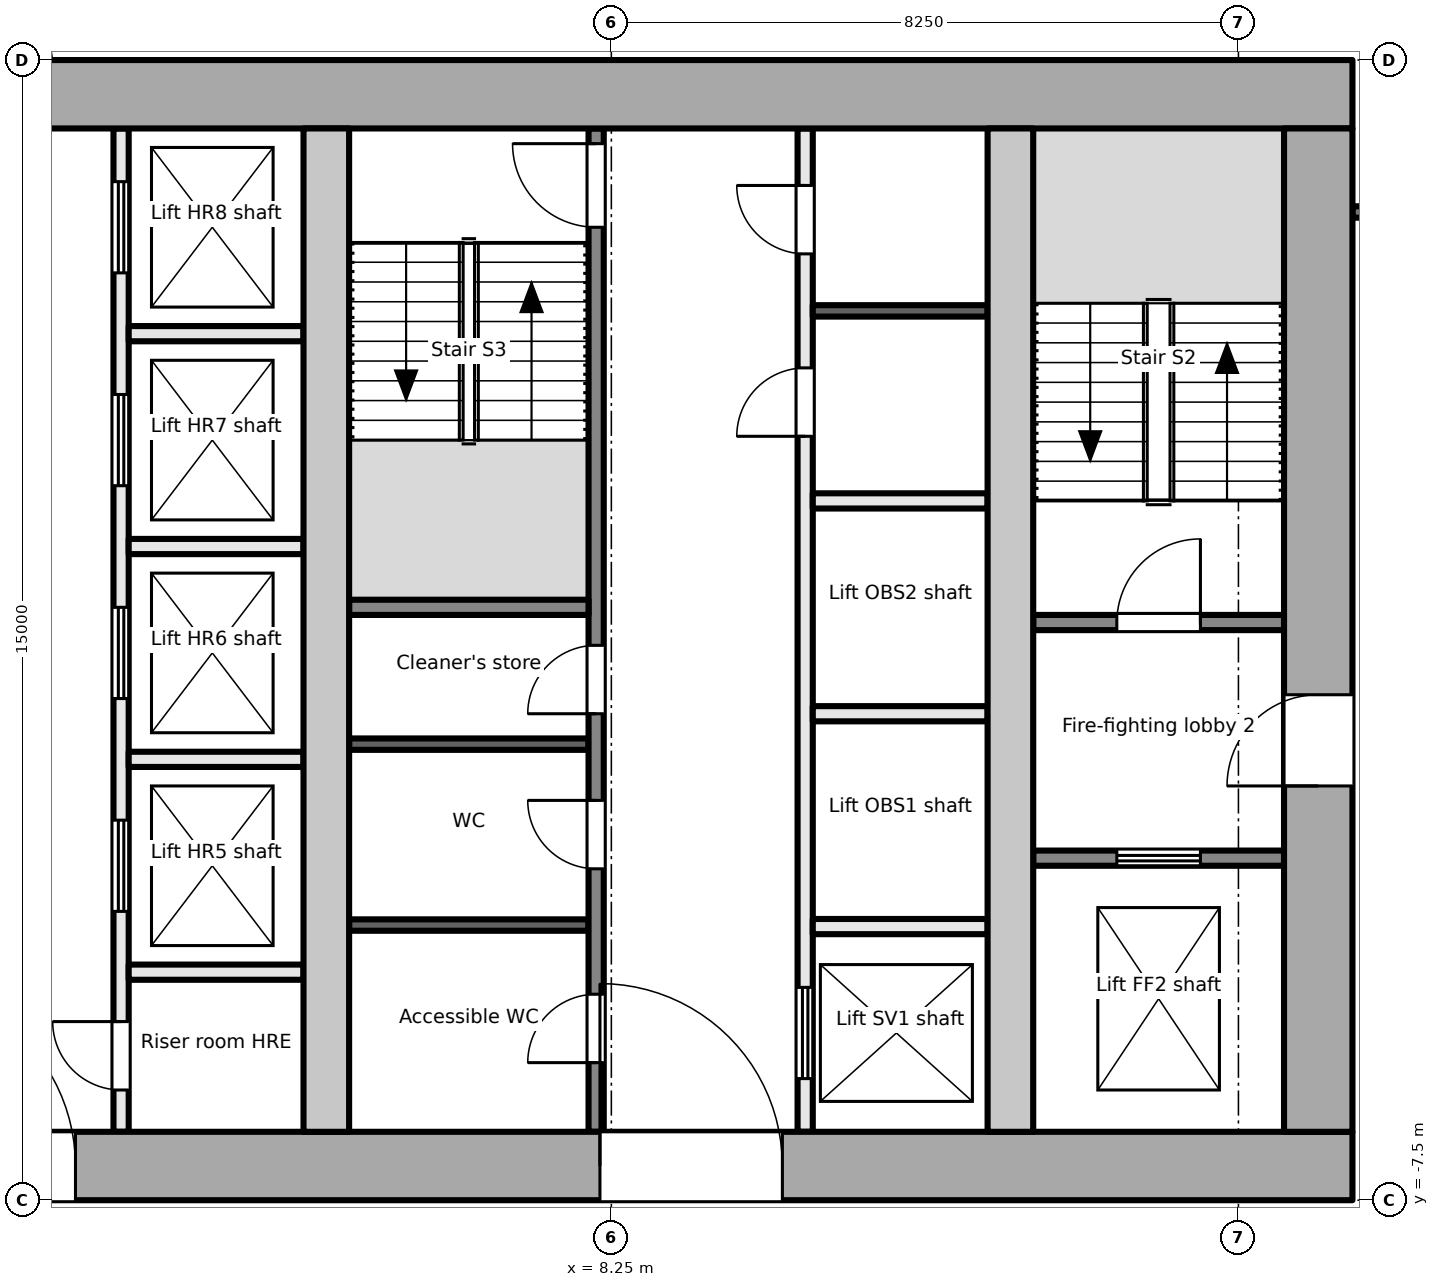
"""IFC4 building model, lengths in metres.
Left out: names, types, materials, properties, quantities, classifications, styles, units other than length and angle.
Written with IfcOpenShell. Run it as: python <this file> out.ifc"""

import sys

from ifc_helpers import new_model, si_unit, direction, frame, frame_2d, origin, place, context, subcontext, project, spatial, rectangle, extrude, element, fill, save


model = new_model("IFC4")
c1 = context("Model", 3, precision=1e-05, world=origin(), true_north=direction((0.0, 1.0)))
c2 = subcontext(c1, "Body", "Model", "MODEL_VIEW")
j1 = project(units=[si_unit("LENGTHUNIT", "METRE"), si_unit("PLANEANGLEUNIT", "RADIAN")], contexts=[c1])
p1 = place(None, origin())
s1 = spatial("IfcSite", under=j1, at=p1, CompositionType="ELEMENT")
p2 = place(p1, origin())
s2 = spatial("IfcBuilding", under=s1, at=p2, CompositionType="ELEMENT")
p3 = place(p2, frame((0.0, 0.0, 176.3)))
s3 = spatial("IfcBuildingStorey", under=s2, at=p3, CompositionType="ELEMENT", Elevation=176.3)
p4 = place(p3, frame((-18.0, -7.05, -0.2), z_axis=(0.0, 0.0, 1.0), x_axis=(1.0, 0.0, 0.0)))
e1 = element("IfcWall", 1, at=p4, inside=s3, PredefinedType="SHEAR", context=c2, shape_type="SweptSolid", body=[
    extrude(rectangle(XDim=36.0, YDim=0.9, at=frame_2d((18.0, 0.0))), origin(), (0.0, 0.0, 1.0), 3.9),
])
p5 = place(p4, frame((8.1, 0.0, 0.2)))
e2 = element("IfcOpeningElement", 2, at=p5, cuts=e1, PredefinedType="OPENING", context=c2, shape_type="SweptSolid", body=[
    extrude(rectangle(XDim=1.8, YDim=2.1, at=frame_2d((0.9, 1.05))), frame((0.0, 0.46, 0.0), z_axis=(0.0, -1.0, 0.0), x_axis=(1.0, 0.0, 0.0)), (0.0, 0.0, 1.0), 0.921),
])
p6 = place(p4, frame((16.8, 0.0, 0.2)))
e3 = element("IfcOpeningElement", 3, at=p6, cuts=e1, PredefinedType="OPENING", context=c2, shape_type="SweptSolid", body=[
    extrude(rectangle(XDim=2.4, YDim=2.1, at=frame_2d((1.2, 1.05))), frame((0.0, 0.46, 0.0), z_axis=(0.0, -1.0, 0.0), x_axis=(1.0, 0.0, 0.0)), (0.0, 0.0, 1.0), 0.921),
])
p7 = place(p4, frame((26.1, 0.0, 0.2)))
e4 = element("IfcOpeningElement", 4, at=p7, cuts=e1, PredefinedType="OPENING", context=c2, shape_type="SweptSolid", body=[
    extrude(rectangle(XDim=2.4, YDim=2.1, at=frame_2d((1.2, 1.05))), frame((0.0, 0.46, 0.0), z_axis=(0.0, -1.0, 0.0), x_axis=(1.0, 0.0, 0.0)), (0.0, 0.0, 1.0), 0.921),
])
p8 = place(p3, frame((-18.0, 7.05, -0.2), z_axis=(0.0, 0.0, 1.0), x_axis=(1.0, 0.0, 0.0)))
e5 = element("IfcWall", 5, at=p8, inside=s3, PredefinedType="SHEAR", context=c2, shape_type="SweptSolid", body=[
    extrude(rectangle(XDim=36.0, YDim=0.9, at=frame_2d((18.0, 0.0))), origin(), (0.0, 0.0, 1.0), 3.9),
])
p9 = place(p3, frame((17.55, -6.6, -0.2), z_axis=(0.0, 0.0, 1.0), x_axis=(0.0, 1.0, 0.0)))
e6 = element("IfcWall", 6, at=p9, inside=s3, PredefinedType="SHEAR", context=c2, shape_type="SweptSolid", body=[
    extrude(rectangle(XDim=13.2, YDim=0.9, at=frame_2d((6.6, 0.0))), origin(), (0.0, 0.0, 1.0), 3.9),
])
p10 = place(p9, frame((4.55, 0.0, 0.2)))
e7 = element("IfcOpeningElement", 7, at=p10, cuts=e6, PredefinedType="OPENING", context=c2, shape_type="SweptSolid", body=[
    extrude(rectangle(XDim=1.2, YDim=2.1, at=frame_2d((0.6, 1.05))), frame((0.0, 0.46, 0.0), z_axis=(0.0, -1.0, 0.0), x_axis=(1.0, 0.0, 0.0)), (0.0, 0.0, 1.0), 0.921),
])
for number, where, z_axis, x_axis in (
    (8, (4.5, -6.6, -0.2), (0.0, 0.0, 1.0), (0.0, 1.0, 0.0)),
    (9, (13.5, -6.6, -0.2), (0.0, 0.0, 1.0), (0.0, 1.0, 0.0)),
):
    element("IfcWall", number, at=place(p3, frame(where, z_axis=z_axis, x_axis=x_axis)), inside=s3, PredefinedType="SHEAR", context=c2, shape_type="SweptSolid", body=[
        extrude(rectangle(XDim=13.2, YDim=0.6, at=frame_2d((6.6, 0.0))), origin(), (0.0, 0.0, 1.0), 3.9),
    ])
p11 = place(p3, frame((13.8, -3.0, 0.0), z_axis=(0.0, 0.0, 1.0), x_axis=(1.0, 0.0, 0.0)))
e10 = element("IfcWall", 10, at=p11, inside=s3, PredefinedType="PARTITIONING", context=c2, shape_type="SweptSolid", body=[
    extrude(rectangle(XDim=3.3, YDim=0.2, at=frame_2d((1.65, 0.0))), origin(), (0.0, 0.0, 1.0), 3.7),
])
p12 = place(p11, frame((1.1, 0.0, 0.0)))
e11 = element("IfcOpeningElement", 11, at=p12, cuts=e10, PredefinedType="OPENING", context=c2, shape_type="SweptSolid", body=[
    extrude(rectangle(XDim=1.1, YDim=2.1, at=frame_2d((0.55, 1.05))), frame((0.0, 0.111, 0.0), z_axis=(0.0, -1.0, 0.0), x_axis=(1.0, 0.0, 0.0)), (0.0, 0.0, 1.0), 0.221),
])
p13 = place(p3, frame((13.8, 0.1, 0.0), z_axis=(0.0, 0.0, 1.0), x_axis=(1.0, 0.0, 0.0)))
e12 = element("IfcWall", 12, at=p13, inside=s3, PredefinedType="PARTITIONING", context=c2, shape_type="SweptSolid", body=[
    extrude(rectangle(XDim=3.3, YDim=0.2, at=frame_2d((1.65, 0.0))), origin(), (0.0, 0.0, 1.0), 3.7),
])
p14 = place(p13, frame((1.1, 0.0, 0.0)))
e13 = element("IfcOpeningElement", 13, at=p14, cuts=e12, PredefinedType="OPENING", context=c2, shape_type="SweptSolid", body=[
    extrude(rectangle(XDim=1.1, YDim=2.1, at=frame_2d((0.55, 1.05))), frame((0.0, 0.111, 0.0), z_axis=(0.0, -1.0, 0.0), x_axis=(1.0, 0.0, 0.0)), (0.0, 0.0, 1.0), 0.221),
])
p15 = place(p3, frame((1.8, -6.6, 0.0), z_axis=(0.0, 0.0, 1.0), x_axis=(0.0, 1.0, 0.0)))
e14 = element("IfcWall", 14, at=p15, inside=s3, PredefinedType="PARTITIONING", context=c2, shape_type="SweptSolid", body=[
    extrude(rectangle(XDim=13.2, YDim=0.2, at=frame_2d((6.6, 0.0))), origin(), (0.0, 0.0, 1.0), 3.7),
])
p16 = place(p15, frame((0.55, 0.0, 0.0)))
e15 = element("IfcOpeningElement", 15, at=p16, cuts=e14, PredefinedType="OPENING", context=c2, shape_type="SweptSolid", body=[
    extrude(rectangle(XDim=0.9, YDim=2.1, at=frame_2d((0.45, 1.05))), frame((0.0, 0.111, 0.0), z_axis=(0.0, -1.0, 0.0), x_axis=(1.0, 0.0, 0.0)), (0.0, 0.0, 1.0), 0.221),
])
p17 = place(p15, frame((2.9, 0.0, 0.0)))
e16 = element("IfcOpeningElement", 16, at=p17, cuts=e14, PredefinedType="OPENING", context=c2, shape_type="SweptSolid", body=[
    extrude(rectangle(XDim=1.2, YDim=2.1, at=frame_2d((0.6, 1.05))), frame((0.0, 0.111, 0.0), z_axis=(0.0, -1.0, 0.0), x_axis=(1.0, 0.0, 0.0)), (0.0, 0.0, 1.0), 0.221),
])
p18 = place(p15, frame((5.7, 0.0, 0.0)))
e17 = element("IfcOpeningElement", 17, at=p18, cuts=e14, PredefinedType="OPENING", context=c2, shape_type="SweptSolid", body=[
    extrude(rectangle(XDim=1.2, YDim=2.1, at=frame_2d((0.6, 1.05))), frame((0.0, 0.111, 0.0), z_axis=(0.0, -1.0, 0.0), x_axis=(1.0, 0.0, 0.0)), (0.0, 0.0, 1.0), 0.221),
])
p19 = place(p15, frame((8.5, 0.0, 0.0)))
e18 = element("IfcOpeningElement", 18, at=p19, cuts=e14, PredefinedType="OPENING", context=c2, shape_type="SweptSolid", body=[
    extrude(rectangle(XDim=1.2, YDim=2.1, at=frame_2d((0.6, 1.05))), frame((0.0, 0.111, 0.0), z_axis=(0.0, -1.0, 0.0), x_axis=(1.0, 0.0, 0.0)), (0.0, 0.0, 1.0), 0.221),
])
p20 = place(p15, frame((11.3, 0.0, 0.0)))
e19 = element("IfcOpeningElement", 19, at=p20, cuts=e14, PredefinedType="OPENING", context=c2, shape_type="SweptSolid", body=[
    extrude(rectangle(XDim=1.2, YDim=2.1, at=frame_2d((0.6, 1.05))), frame((0.0, 0.111, 0.0), z_axis=(0.0, -1.0, 0.0), x_axis=(1.0, 0.0, 0.0)), (0.0, 0.0, 1.0), 0.221),
])
for number, where, z_axis, x_axis in (
    (20, (1.9, -1.7, 0.0), (0.0, 0.0, 1.0), (1.0, 0.0, 0.0)),
    (21, (1.9, 1.1, 0.0), (0.0, 0.0, 1.0), (1.0, 0.0, 0.0)),
    (22, (1.9, 3.9, 0.0), (0.0, 0.0, 1.0), (1.0, 0.0, 0.0)),
    (23, (1.9, -4.5, 0.0), (0.0, 0.0, 1.0), (1.0, 0.0, 0.0)),
):
    element("IfcWall", number, at=place(p3, frame(where, z_axis=z_axis, x_axis=x_axis)), inside=s3, PredefinedType="PARTITIONING", context=c2, shape_type="SweptSolid", body=[
        extrude(rectangle(XDim=2.3, YDim=0.2, at=frame_2d((1.15, 0.0))), origin(), (0.0, 0.0, 1.0), 3.7),
    ])
p21 = place(p3, frame((8.05, -6.6, 0.0), z_axis=(0.0, 0.0, 1.0), x_axis=(0.0, 1.0, 0.0)))
e24 = element("IfcWall", 24, at=p21, inside=s3, PredefinedType="PARTITIONING", context=c2, shape_type="SweptSolid", body=[
    extrude(rectangle(XDim=13.2, YDim=0.2, at=frame_2d((6.6, 0.0))), origin(), (0.0, 0.0, 1.0), 3.7),
])
p22 = place(p21, frame((0.91, 0.0, 0.0)))
e25 = element("IfcOpeningElement", 25, at=p22, cuts=e24, PredefinedType="OPENING", context=c2, shape_type="SweptSolid", body=[
    extrude(rectangle(XDim=0.9, YDim=2.1, at=frame_2d((0.45, 1.05))), frame((0.0, 0.111, 0.0), z_axis=(0.0, -1.0, 0.0), x_axis=(1.0, 0.0, 0.0)), (0.0, 0.0, 1.0), 0.221),
])
p23 = place(p21, frame((3.46, 0.0, 0.0)))
e26 = element("IfcOpeningElement", 26, at=p23, cuts=e24, PredefinedType="OPENING", context=c2, shape_type="SweptSolid", body=[
    extrude(rectangle(XDim=0.9, YDim=2.1, at=frame_2d((0.45, 1.05))), frame((0.0, 0.111, 0.0), z_axis=(0.0, -1.0, 0.0), x_axis=(1.0, 0.0, 0.0)), (0.0, 0.0, 1.0), 0.221),
])
p24 = place(p21, frame((5.5, 0.0, 0.0)))
e27 = element("IfcOpeningElement", 27, at=p24, cuts=e24, PredefinedType="OPENING", context=c2, shape_type="SweptSolid", body=[
    extrude(rectangle(XDim=0.9, YDim=2.1, at=frame_2d((0.45, 1.05))), frame((0.0, 0.111, 0.0), z_axis=(0.0, -1.0, 0.0), x_axis=(1.0, 0.0, 0.0)), (0.0, 0.0, 1.0), 0.221),
])
p25 = place(p21, frame((11.9, 0.0, 0.0)))
e28 = element("IfcOpeningElement", 28, at=p25, cuts=e24, PredefinedType="OPENING", context=c2, shape_type="SweptSolid", body=[
    extrude(rectangle(XDim=1.1, YDim=2.1, at=frame_2d((0.55, 1.05))), frame((0.0, 0.111, 0.0), z_axis=(0.0, -1.0, 0.0), x_axis=(1.0, 0.0, 0.0)), (0.0, 0.0, 1.0), 0.221),
])
p26 = place(p3, frame((10.8, -6.6, 0.0), z_axis=(0.0, 0.0, 1.0), x_axis=(0.0, 1.0, 0.0)))
e29 = element("IfcWall", 29, at=p26, inside=s3, PredefinedType="PARTITIONING", context=c2, shape_type="SweptSolid", body=[
    extrude(rectangle(XDim=13.2, YDim=0.2, at=frame_2d((6.6, 0.0))), origin(), (0.0, 0.0, 1.0), 3.7),
])
p27 = place(p26, frame((0.7, 0.0, 0.0)))
e30 = element("IfcOpeningElement", 30, at=p27, cuts=e29, PredefinedType="OPENING", context=c2, shape_type="SweptSolid", body=[
    extrude(rectangle(XDim=1.2, YDim=2.1, at=frame_2d((0.6, 1.05))), frame((0.0, 0.111, 0.0), z_axis=(0.0, -1.0, 0.0), x_axis=(1.0, 0.0, 0.0)), (0.0, 0.0, 1.0), 0.221),
])
p28 = place(p26, frame((9.15, 0.0, 0.0)))
e31 = element("IfcOpeningElement", 31, at=p28, cuts=e29, PredefinedType="OPENING", context=c2, shape_type="SweptSolid", body=[
    extrude(rectangle(XDim=0.9, YDim=2.1, at=frame_2d((0.45, 1.05))), frame((0.0, 0.111, 0.0), z_axis=(0.0, -1.0, 0.0), x_axis=(1.0, 0.0, 0.0)), (0.0, 0.0, 1.0), 0.221),
])
p29 = place(p26, frame((11.55, 0.0, 0.0)))
e32 = element("IfcOpeningElement", 32, at=p29, cuts=e29, PredefinedType="OPENING", context=c2, shape_type="SweptSolid", body=[
    extrude(rectangle(XDim=0.9, YDim=2.1, at=frame_2d((0.45, 1.05))), frame((0.0, 0.111, 0.0), z_axis=(0.0, -1.0, 0.0), x_axis=(1.0, 0.0, 0.0)), (0.0, 0.0, 1.0), 0.221),
])
p30 = place(p3, frame((4.8, 0.3, 0.0), z_axis=(0.0, 0.0, 1.0), x_axis=(1.0, 0.0, 0.0)))
e33 = element("IfcWall", 33, at=p30, inside=s3, PredefinedType="PARTITIONING", context=c2, shape_type="SweptSolid", body=[
    extrude(rectangle(XDim=3.15, YDim=0.2, at=frame_2d((1.575, 0.0))), origin(), (0.0, 0.0, 1.0), 3.7),
])
for number, where, z_axis, x_axis in (
    (34, (4.8, -3.88, 0.0), (0.0, 0.0, 1.0), (1.0, 0.0, 0.0)),
    (35, (4.8, -1.5, 0.0), (0.0, 0.0, 1.0), (1.0, 0.0, 0.0)),
):
    element("IfcWall", number, at=place(p3, frame(where, z_axis=z_axis, x_axis=x_axis)), inside=s3, PredefinedType="PARTITIONING", context=c2, shape_type="SweptSolid", body=[
        extrude(rectangle(XDim=3.15, YDim=0.15, at=frame_2d((1.575, 0.0))), origin(), (0.0, 0.0, 1.0), 3.7),
    ])
for number, where, z_axis, x_axis in (
    (36, (10.9, -3.9, 0.0), (0.0, 0.0, 1.0), (1.0, 0.0, 0.0)),
    (37, (10.9, -1.1, 0.0), (0.0, 0.0, 1.0), (1.0, 0.0, 0.0)),
    (38, (10.9, 1.7, 0.0), (0.0, 0.0, 1.0), (1.0, 0.0, 0.0)),
):
    element("IfcWall", number, at=place(p3, frame(where, z_axis=z_axis, x_axis=x_axis)), inside=s3, PredefinedType="PARTITIONING", context=c2, shape_type="SweptSolid", body=[
        extrude(rectangle(XDim=2.3, YDim=0.2, at=frame_2d((1.15, 0.0))), origin(), (0.0, 0.0, 1.0), 3.7),
    ])
p31 = place(p3, frame((10.9, 4.2, 0.0), z_axis=(0.0, 0.0, 1.0), x_axis=(1.0, 0.0, 0.0)))
e39 = element("IfcWall", 39, at=p31, inside=s3, PredefinedType="PARTITIONING", context=c2, shape_type="SweptSolid", body=[
    extrude(rectangle(XDim=2.3, YDim=0.15, at=frame_2d((1.15, 0.0))), origin(), (0.0, 0.0, 1.0), 3.7),
])
p32 = place(p3, frame((18.0, 5.501, 0.0), z_axis=(0.0, 0.0, 1.0), x_axis=(1.0, 0.0, 0.0)))
e40 = element("IfcWall", 40, at=p32, inside=s3, PredefinedType="PARTITIONING", context=c2, shape_type="SweptSolid", body=[
    extrude(rectangle(XDim=2.325, YDim=0.15, at=frame_2d((1.163, 0.0))), origin(), (0.0, 0.0, 1.0), 3.7),
])
p33 = place(p32, frame((0.268, 0.0, 0.0)))
e41 = element("IfcOpeningElement", 41, at=p33, cuts=e40, PredefinedType="OPENING", context=c2, shape_type="SweptSolid", body=[
    extrude(rectangle(XDim=1.8, YDim=2.1, at=frame_2d((0.9, 1.05))), frame((0.0, 0.085, 0.0), z_axis=(0.0, -1.0, 0.0), x_axis=(1.0, 0.0, 0.0)), (0.0, 0.0, 1.0), 0.171),
])
p34 = place(p12, origin())
e42 = element("IfcDoor", 42, at=p34, inside=s3, OperationType="DOUBLE_DOOR_SLIDING", PredefinedType="DOOR", context=c2, shape_type="SweptSolid", body=[
    extrude(rectangle(XDim=1.1, YDim=2.1, at=frame_2d((0.55, 1.05))), frame((0.0, 0.025, 0.0), z_axis=(0.0, -1.0, 0.0), x_axis=(1.0, 0.0, 0.0)), (0.0, 0.0, 1.0), 0.05),
])
fill(e11, e42)
p35 = place(p10, origin())
e43 = element("IfcDoor", 43, at=p35, inside=s3, OperationType="SINGLE_SWING_LEFT", PredefinedType="DOOR", context=c2, shape_type="SweptSolid", body=[
    extrude(rectangle(XDim=1.2, YDim=2.1, at=frame_2d((0.6, 1.05))), frame((0.0, 0.025, 0.0), z_axis=(0.0, -1.0, 0.0), x_axis=(1.0, 0.0, 0.0)), (0.0, 0.0, 1.0), 0.05),
])
fill(e7, e43)
p36 = place(p14, origin())
e44 = element("IfcDoor", 44, at=p36, inside=s3, OperationType="SINGLE_SWING_RIGHT", PredefinedType="DOOR", context=c2, shape_type="SweptSolid", body=[
    extrude(rectangle(XDim=1.1, YDim=2.1, at=frame_2d((0.55, 1.05))), frame((0.0, 0.025, 0.0), z_axis=(0.0, -1.0, 0.0), x_axis=(1.0, 0.0, 0.0)), (0.0, 0.0, 1.0), 0.05),
])
fill(e13, e44)
p37 = place(p16, origin())
e45 = element("IfcDoor", 45, at=p37, inside=s3, OperationType="SINGLE_SWING_RIGHT", PredefinedType="DOOR", context=c2, shape_type="SweptSolid", body=[
    extrude(rectangle(XDim=0.9, YDim=2.1, at=frame_2d((0.45, 1.05))), frame((0.0, 0.025, 0.0), z_axis=(0.0, -1.0, 0.0), x_axis=(1.0, 0.0, 0.0)), (0.0, 0.0, 1.0), 0.05),
])
fill(e15, e45)
p38 = place(p17, origin())
e46 = element("IfcDoor", 46, at=p38, inside=s3, OperationType="DOUBLE_DOOR_SLIDING", PredefinedType="DOOR", context=c2, shape_type="SweptSolid", body=[
    extrude(rectangle(XDim=1.2, YDim=2.1, at=frame_2d((0.6, 1.05))), frame((0.0, 0.025, 0.0), z_axis=(0.0, -1.0, 0.0), x_axis=(1.0, 0.0, 0.0)), (0.0, 0.0, 1.0), 0.05),
])
fill(e16, e46)
p39 = place(p18, origin())
e47 = element("IfcDoor", 47, at=p39, inside=s3, OperationType="DOUBLE_DOOR_SLIDING", PredefinedType="DOOR", context=c2, shape_type="SweptSolid", body=[
    extrude(rectangle(XDim=1.2, YDim=2.1, at=frame_2d((0.6, 1.05))), frame((0.0, 0.025, 0.0), z_axis=(0.0, -1.0, 0.0), x_axis=(1.0, 0.0, 0.0)), (0.0, 0.0, 1.0), 0.05),
])
fill(e17, e47)
p40 = place(p19, origin())
e48 = element("IfcDoor", 48, at=p40, inside=s3, OperationType="DOUBLE_DOOR_SLIDING", PredefinedType="DOOR", context=c2, shape_type="SweptSolid", body=[
    extrude(rectangle(XDim=1.2, YDim=2.1, at=frame_2d((0.6, 1.05))), frame((0.0, 0.025, 0.0), z_axis=(0.0, -1.0, 0.0), x_axis=(1.0, 0.0, 0.0)), (0.0, 0.0, 1.0), 0.05),
])
fill(e18, e48)
p41 = place(p20, origin())
e49 = element("IfcDoor", 49, at=p41, inside=s3, OperationType="DOUBLE_DOOR_SLIDING", PredefinedType="DOOR", context=c2, shape_type="SweptSolid", body=[
    extrude(rectangle(XDim=1.2, YDim=2.1, at=frame_2d((0.6, 1.05))), frame((0.0, 0.025, 0.0), z_axis=(0.0, -1.0, 0.0), x_axis=(1.0, 0.0, 0.0)), (0.0, 0.0, 1.0), 0.05),
])
fill(e19, e49)
p42 = place(p6, origin())
e50 = element("IfcDoor", 50, at=p42, inside=s3, OperationType="DOUBLE_DOOR_DOUBLE_SWING", PredefinedType="DOOR", context=c2, shape_type="SweptSolid", body=[
    extrude(rectangle(XDim=2.4, YDim=2.1, at=frame_2d((1.2, 1.05))), frame((0.0, 0.025, 0.0), z_axis=(0.0, -1.0, 0.0), x_axis=(1.0, 0.0, 0.0)), (0.0, 0.0, 1.0), 0.05),
])
fill(e3, e50)
p43 = place(p22, origin())
e51 = element("IfcDoor", 51, at=p43, inside=s3, OperationType="SINGLE_SWING_LEFT", PredefinedType="DOOR", context=c2, shape_type="SweptSolid", body=[
    extrude(rectangle(XDim=0.9, YDim=2.1, at=frame_2d((0.45, 1.05))), frame((0.0, 0.025, 0.0), z_axis=(0.0, -1.0, 0.0), x_axis=(1.0, 0.0, 0.0)), (0.0, 0.0, 1.0), 0.05),
])
fill(e25, e51)
p44 = place(p23, origin())
e52 = element("IfcDoor", 52, at=p44, inside=s3, OperationType="SINGLE_SWING_RIGHT", PredefinedType="DOOR", context=c2, shape_type="SweptSolid", body=[
    extrude(rectangle(XDim=0.9, YDim=2.1, at=frame_2d((0.45, 1.05))), frame((0.0, 0.025, 0.0), z_axis=(0.0, -1.0, 0.0), x_axis=(1.0, 0.0, 0.0)), (0.0, 0.0, 1.0), 0.05),
])
fill(e26, e52)
p45 = place(p24, origin())
e53 = element("IfcDoor", 53, at=p45, inside=s3, OperationType="SINGLE_SWING_LEFT", PredefinedType="DOOR", context=c2, shape_type="SweptSolid", body=[
    extrude(rectangle(XDim=0.9, YDim=2.1, at=frame_2d((0.45, 1.05))), frame((0.0, 0.025, 0.0), z_axis=(0.0, -1.0, 0.0), x_axis=(1.0, 0.0, 0.0)), (0.0, 0.0, 1.0), 0.05),
])
fill(e27, e53)
p46 = place(p25, origin())
e54 = element("IfcDoor", 54, at=p46, inside=s3, OperationType="SINGLE_SWING_RIGHT", PredefinedType="DOOR", context=c2, shape_type="SweptSolid", body=[
    extrude(rectangle(XDim=1.1, YDim=2.1, at=frame_2d((0.55, 1.05))), frame((0.0, 0.025, 0.0), z_axis=(0.0, -1.0, 0.0), x_axis=(1.0, 0.0, 0.0)), (0.0, 0.0, 1.0), 0.05),
])
fill(e28, e54)
p47 = place(p7, origin())
e55 = element("IfcDoor", 55, at=p47, inside=s3, OperationType="DOUBLE_DOOR_DOUBLE_SWING", PredefinedType="DOOR", context=c2, shape_type="SweptSolid", body=[
    extrude(rectangle(XDim=2.4, YDim=2.1, at=frame_2d((1.2, 1.05))), frame((0.0, 0.025, 0.0), z_axis=(0.0, -1.0, 0.0), x_axis=(1.0, 0.0, 0.0)), (0.0, 0.0, 1.0), 0.05),
])
fill(e4, e55)
p48 = place(p27, origin())
e56 = element("IfcDoor", 56, at=p48, inside=s3, OperationType="DOUBLE_DOOR_SLIDING", PredefinedType="DOOR", context=c2, shape_type="SweptSolid", body=[
    extrude(rectangle(XDim=1.2, YDim=2.1, at=frame_2d((0.6, 1.05))), frame((0.0, 0.025, 0.0), z_axis=(0.0, -1.0, 0.0), x_axis=(1.0, 0.0, 0.0)), (0.0, 0.0, 1.0), 0.05),
])
fill(e30, e56)
p49 = place(p28, origin())
e57 = element("IfcDoor", 57, at=p49, inside=s3, OperationType="SINGLE_SWING_LEFT", PredefinedType="DOOR", context=c2, shape_type="SweptSolid", body=[
    extrude(rectangle(XDim=0.9, YDim=2.1, at=frame_2d((0.45, 1.05))), frame((0.0, 0.025, 0.0), z_axis=(0.0, -1.0, 0.0), x_axis=(1.0, 0.0, 0.0)), (0.0, 0.0, 1.0), 0.05),
])
fill(e31, e57)
p50 = place(p29, origin())
e58 = element("IfcDoor", 58, at=p50, inside=s3, OperationType="SINGLE_SWING_RIGHT", PredefinedType="DOOR", context=c2, shape_type="SweptSolid", body=[
    extrude(rectangle(XDim=0.9, YDim=2.1, at=frame_2d((0.45, 1.05))), frame((0.0, 0.025, 0.0), z_axis=(0.0, -1.0, 0.0), x_axis=(1.0, 0.0, 0.0)), (0.0, 0.0, 1.0), 0.05),
])
fill(e32, e58)
save(model, sys.argv[1])
